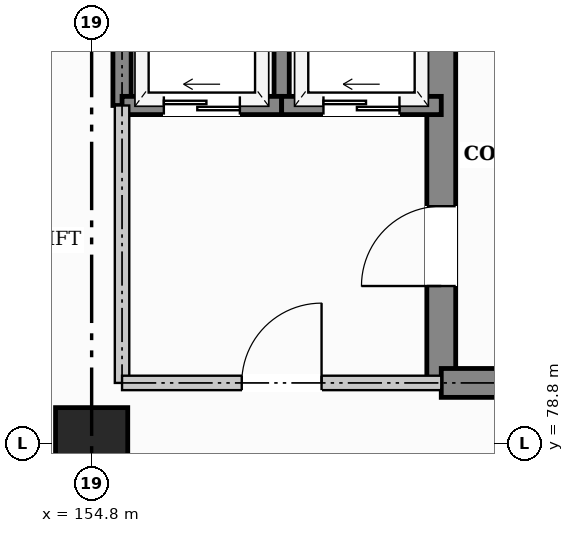
"""IFC4 building model, lengths in metres.
Left out: names, types, materials, properties, quantities, classifications, styles, units other than length and angle.
Written with IfcOpenShell. Run it as: python <this file> out.ifc"""

import sys

from ifc_helpers import new_model, si_unit, direction, frame, frame_2d, origin, origin_2d, place, context, subcontext, project, spatial, rectangle, extrude, element, fill, save


model = new_model("IFC4")
c1 = context("Model", 3, precision=1e-05, world=origin(), true_north=direction((0.0, 1.0)))
c2 = subcontext(c1, "Body", "Model", "MODEL_VIEW")
j1 = project(units=[si_unit("LENGTHUNIT", "METRE"), si_unit("PLANEANGLEUNIT", "RADIAN")], contexts=[c1])
p1 = place(None, origin())
s1 = spatial("IfcSite", under=j1, at=p1, CompositionType="ELEMENT")
p2 = place(p1, origin())
s2 = spatial("IfcBuilding", under=s1, at=p2, CompositionType="ELEMENT")
p3 = place(p2, frame((0.0, 0.0, -4.2)))
s3 = spatial("IfcBuildingStorey", under=s2, at=p3, CompositionType="ELEMENT", Elevation=-4.2)
p4 = place(p3, frame((154.8, 78.8, 0.0), z_axis=(0.0, 0.0, 1.0), x_axis=(1.0, 0.0, 0.0)))
e1 = element("IfcColumn", 1, at=p4, inside=s3, PredefinedType="COLUMN", context=c2, shape_type="SweptSolid", body=[
    extrude(rectangle(XDim=0.95, YDim=0.95, at=origin_2d()), origin(), (0.0, 0.0, 1.0), 4.2),
])
p5 = place(p3, frame((159.4, 79.6, 0.0), z_axis=(0.0, 0.0, 1.0), x_axis=(0.0, 1.0, 0.0)))
e2 = element("IfcWall", 2, at=p5, inside=s3, PredefinedType="SHEAR", context=c2, shape_type="SweptSolid", body=[
    extrude(rectangle(XDim=6.0, YDim=0.38, at=frame_2d((3.0, 0.0))), origin(), (0.0, 0.0, 1.0), 3.84),
])
p6 = place(p5, frame((1.275, 0.0, 0.0)))
e3 = element("IfcOpeningElement", 3, at=p6, cuts=e2, PredefinedType="OPENING", context=c2, shape_type="SweptSolid", body=[
    extrude(rectangle(XDim=1.05, YDim=2.15, at=frame_2d((0.525, 1.075))), frame((0.0, 0.2, 0.0), z_axis=(0.0, -1.0, 0.0), x_axis=(1.0, 0.0, 0.0)), (0.0, 0.0, 1.0), 0.4),
])
p7 = place(p3, frame((159.4, 79.6, 0.0), z_axis=(0.0, 0.0, 1.0), x_axis=(1.0, 0.0, 0.0)))
e4 = element("IfcWall", 4, at=p7, inside=s3, PredefinedType="SHEAR", context=c2, shape_type="SweptSolid", body=[
    extrude(rectangle(XDim=7.0, YDim=0.38, at=frame_2d((3.5, 0.0))), origin(), (0.0, 0.0, 1.0), 3.84),
])
p8 = place(p3, frame((155.2, 83.25, 0.0), z_axis=(0.0, 0.0, 1.0), x_axis=(0.0, 1.0, 0.0)))
e5 = element("IfcWall", 5, at=p8, inside=s3, PredefinedType="SHEAR", context=c2, shape_type="SweptSolid", body=[
    extrude(rectangle(XDim=2.35, YDim=0.24, at=frame_2d((1.175, 0.0))), origin(), (0.0, 0.0, 1.0), 3.84),
])
p9 = place(p3, frame((157.3, 83.25, 0.0), z_axis=(0.0, 0.0, 1.0), x_axis=(0.0, 1.0, 0.0)))
e6 = element("IfcWall", 6, at=p9, inside=s3, PredefinedType="SHEAR", context=c2, shape_type="SweptSolid", body=[
    extrude(rectangle(XDim=2.35, YDim=0.2, at=frame_2d((1.175, 0.0))), origin(), (0.0, 0.0, 1.0), 3.84),
])
p10 = place(p3, frame((155.2, 83.25, 0.0), z_axis=(0.0, 0.0, 1.0), x_axis=(1.0, 0.0, 0.0)))
e7 = element("IfcWall", 7, at=p10, inside=s3, PredefinedType="SHEAR", context=c2, shape_type="SweptSolid", body=[
    extrude(rectangle(XDim=2.1, YDim=0.24, at=frame_2d((1.05, 0.0))), origin(), (0.0, 0.0, 1.0), 3.84),
])
p11 = place(p10, frame((0.55, 0.0, 0.0)))
e8 = element("IfcOpeningElement", 8, at=p11, cuts=e7, PredefinedType="OPENING", context=c2, shape_type="SweptSolid", body=[
    extrude(rectangle(XDim=1.0, YDim=2.1, at=frame_2d((0.5, 1.05))), frame((0.0, 0.13, 0.0), z_axis=(0.0, -1.0, 0.0), x_axis=(1.0, 0.0, 0.0)), (0.0, 0.0, 1.0), 0.26),
])
p12 = place(p3, frame((157.3, 83.25, 0.0), z_axis=(0.0, 0.0, 1.0), x_axis=(1.0, 0.0, 0.0)))
e9 = element("IfcWall", 9, at=p12, inside=s3, PredefinedType="SHEAR", context=c2, shape_type="SweptSolid", body=[
    extrude(rectangle(XDim=2.1, YDim=0.24, at=frame_2d((1.05, 0.0))), origin(), (0.0, 0.0, 1.0), 3.84),
])
p13 = place(p12, frame((0.55, 0.0, 0.0)))
e10 = element("IfcOpeningElement", 10, at=p13, cuts=e9, PredefinedType="OPENING", context=c2, shape_type="SweptSolid", body=[
    extrude(rectangle(XDim=1.0, YDim=2.1, at=frame_2d((0.5, 1.05))), frame((0.0, 0.13, 0.0), z_axis=(0.0, -1.0, 0.0), x_axis=(1.0, 0.0, 0.0)), (0.0, 0.0, 1.0), 0.26),
])
p14 = place(p3, frame((155.2, 79.6, 0.0), z_axis=(0.0, 0.0, 1.0), x_axis=(0.0, 1.0, 0.0)))
e11 = element("IfcWall", 11, at=p14, inside=s3, PredefinedType="PARTITIONING", context=c2, shape_type="SweptSolid", body=[
    extrude(rectangle(XDim=3.65, YDim=0.19, at=frame_2d((1.825, 0.0))), origin(), (0.0, 0.0, 1.0), 3.84),
])
p15 = place(p3, frame((155.2, 79.6, 0.0), z_axis=(0.0, 0.0, 1.0), x_axis=(1.0, 0.0, 0.0)))
e12 = element("IfcWall", 12, at=p15, inside=s3, PredefinedType="PARTITIONING", context=c2, shape_type="SweptSolid", body=[
    extrude(rectangle(XDim=4.2, YDim=0.19, at=frame_2d((2.1, 0.0))), origin(), (0.0, 0.0, 1.0), 3.84),
])
p16 = place(p15, frame((1.575, 0.0, 0.0)))
e13 = element("IfcOpeningElement", 13, at=p16, cuts=e12, PredefinedType="OPENING", context=c2, shape_type="SweptSolid", body=[
    extrude(rectangle(XDim=1.05, YDim=2.15, at=frame_2d((0.525, 1.075))), frame((0.0, 0.105, 0.0), z_axis=(0.0, -1.0, 0.0), x_axis=(1.0, 0.0, 0.0)), (0.0, 0.0, 1.0), 0.21),
])
p17 = place(p6, origin())
e14 = element("IfcDoor", 14, at=p17, inside=s3, OperationType="SINGLE_SWING_LEFT", PredefinedType="DOOR", context=c2, shape_type="SweptSolid", body=[
    extrude(rectangle(XDim=1.05, YDim=2.15, at=frame_2d((0.525, 1.075))), frame((0.0, 0.025, 0.0), z_axis=(0.0, -1.0, 0.0), x_axis=(1.0, 0.0, 0.0)), (0.0, 0.0, 1.0), 0.05),
])
fill(e3, e14)
p18 = place(p11, origin())
e15 = element("IfcDoor", 15, at=p18, inside=s3, OperationType="SLIDING_TO_LEFT", PredefinedType="DOOR", context=c2, shape_type="SweptSolid", body=[
    extrude(rectangle(XDim=1.0, YDim=2.1, at=frame_2d((0.5, 1.05))), frame((0.0, 0.025, 0.0), z_axis=(0.0, -1.0, 0.0), x_axis=(1.0, 0.0, 0.0)), (0.0, 0.0, 1.0), 0.05),
])
fill(e8, e15)
p19 = place(p13, origin())
e16 = element("IfcDoor", 16, at=p19, inside=s3, OperationType="SLIDING_TO_LEFT", PredefinedType="DOOR", context=c2, shape_type="SweptSolid", body=[
    extrude(rectangle(XDim=1.0, YDim=2.1, at=frame_2d((0.5, 1.05))), frame((0.0, 0.025, 0.0), z_axis=(0.0, -1.0, 0.0), x_axis=(1.0, 0.0, 0.0)), (0.0, 0.0, 1.0), 0.05),
])
fill(e10, e16)
p20 = place(p16, origin())
e17 = element("IfcDoor", 17, at=p20, inside=s3, OperationType="SINGLE_SWING_RIGHT", PredefinedType="DOOR", context=c2, shape_type="SweptSolid", body=[
    extrude(rectangle(XDim=1.05, YDim=2.15, at=frame_2d((0.525, 1.075))), frame((0.0, 0.025, 0.0), z_axis=(0.0, -1.0, 0.0), x_axis=(1.0, 0.0, 0.0)), (0.0, 0.0, 1.0), 0.05),
])
fill(e13, e17)
save(model, sys.argv[1])
